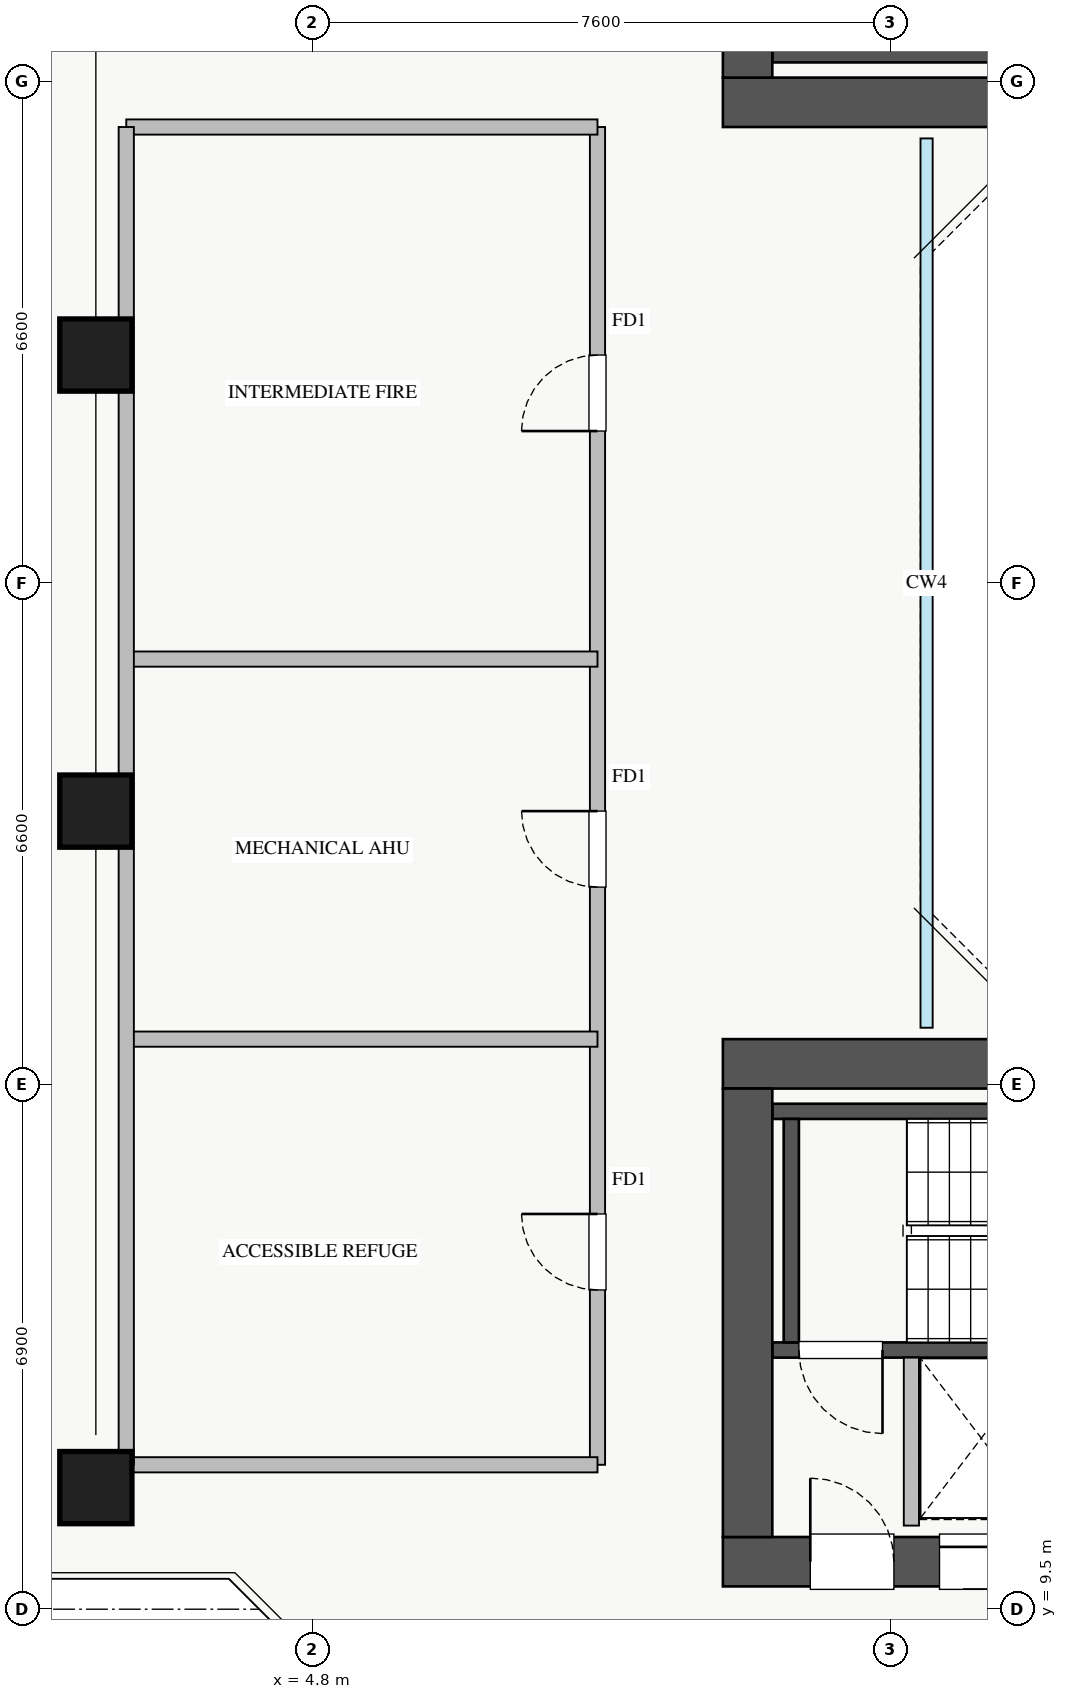
"""IFC4 building model, lengths in metres.
Left out: names, types, materials, properties, quantities, classifications, styles, units other than length and angle.
Written with IfcOpenShell. Run it as: python <this file> out.ifc"""

import sys

from ifc_helpers import new_model, si_unit, direction, frame, frame_2d, origin, origin_2d, place, context, subcontext, project, spatial, rectangle, extrude, source, transform, mapped, element, fill, save


model = new_model("IFC4")
c1 = context("Model", 3, precision=1e-05, world=origin(), true_north=direction((0.0, 1.0)))
c2 = subcontext(c1, "Body", "Model", "MODEL_VIEW")
j1 = project(units=[si_unit("LENGTHUNIT", "METRE"), si_unit("PLANEANGLEUNIT", "RADIAN")], contexts=[c1])
p1 = place(None, origin())
s1 = spatial("IfcSite", under=j1, at=p1, CompositionType="ELEMENT")
p2 = place(p1, origin())
s2 = spatial("IfcBuilding", under=s1, at=p2, CompositionType="ELEMENT")
p3 = place(p2, frame((0.0, 0.0, 186.0)))
s3 = spatial("IfcBuildingStorey", under=s2, at=p3, CompositionType="ELEMENT", Elevation=186.0)
p4 = place(p3, frame((12.68, 12.8, 0.0), z_axis=(0.0, 0.0, 1.0), x_axis=(1.0, 0.0, 0.0)))
e1 = element("IfcWall", 1, at=p4, inside=s3, PredefinedType="SHEAR", context=c2, shape_type="SweptSolid", body=[
    extrude(rectangle(XDim=1.94, YDim=0.18, at=frame_2d((0.97, 0.0))), origin(), (0.0, 0.0, 1.0), 4.32),
])
p5 = place(p3, frame((10.85, 29.95, 0.0), z_axis=(0.0, 0.0, 1.0), x_axis=(1.0, 0.0, 0.0)))
e2 = element("IfcWall", 2, at=p5, inside=s3, PredefinedType="SHEAR", context=c2, shape_type="SweptSolid", body=[
    extrude(rectangle(XDim=7.3, YDim=0.2, at=frame_2d((3.65, 0.0))), origin(), (0.0, 0.0, 1.0), 4.5),
])
p6 = place(p3, frame((10.85, 12.91, 0.0), z_axis=(0.0, 0.0, 1.0), x_axis=(1.0, 0.0, 0.0)))
e3 = element("IfcWall", 3, at=p6, inside=s3, PredefinedType="SHEAR", context=c2, shape_type="SweptSolid", body=[
    extrude(rectangle(XDim=7.3, YDim=0.2, at=frame_2d((3.65, 0.0))), origin(), (0.0, 0.0, 1.0), 4.5),
])
p7 = place(p6, frame((0.35, 0.0, 0.0)))
e4 = element("IfcOpeningElement", 4, at=p7, cuts=e3, PredefinedType="OPENING", context=c2, shape_type="SweptSolid", body=[
    extrude(rectangle(XDim=1.1, YDim=2.05, at=frame_2d((0.55, 1.025))), frame((0.0, 0.11, 0.0), z_axis=(0.0, -1.0, 0.0), x_axis=(1.0, 0.0, 0.0)), (0.0, 0.0, 1.0), 0.22),
])
p8 = place(p3, frame((10.85, 16.05, 0.0), z_axis=(0.0, 0.0, 1.0), x_axis=(1.0, 0.0, 0.0)))
e5 = element("IfcWall", 5, at=p8, inside=s3, PredefinedType="SHEAR", context=c2, shape_type="SweptSolid", body=[
    extrude(rectangle(XDim=7.3, YDim=0.2, at=frame_2d((3.65, 0.0))), origin(), (0.0, 0.0, 1.0), 4.5),
])
p9 = place(p3, frame((11.1, 13.01, 0.0), z_axis=(0.0, 0.0, 1.0), x_axis=(0.0, 1.0, 0.0)))
e6 = element("IfcWall", 6, at=p9, inside=s3, PredefinedType="SHEAR", context=c2, shape_type="SweptSolid", body=[
    extrude(rectangle(XDim=2.94, YDim=0.2, at=frame_2d((1.47, 0.0))), origin(), (0.0, 0.0, 1.0), 4.5),
])
p10 = place(p3, frame((10.2, 29.325, 0.0), z_axis=(0.0, 0.0, 1.0), x_axis=(1.0, 0.0, 0.0)))
e7 = element("IfcWall", 7, at=p10, inside=s3, PredefinedType="SHEAR", context=c2, shape_type="SweptSolid", body=[
    extrude(rectangle(XDim=17.6, YDim=0.65, at=frame_2d((8.8, 0.0))), origin(), (0.0, 0.0, 1.0), 4.5),
])
p11 = place(p3, frame((10.525, 29.65, 0.0), z_axis=(0.0, 0.0, 1.0), x_axis=(0.0, 1.0, 0.0)))
e8 = element("IfcWall", 8, at=p11, inside=s3, PredefinedType="SHEAR", context=c2, shape_type="SweptSolid", body=[
    extrude(rectangle(XDim=5.9, YDim=0.65, at=frame_2d((2.95, 0.0))), origin(), (0.0, 0.0, 1.0), 4.5),
])
p12 = place(p3, frame((10.2, 10.125, 0.0), z_axis=(0.0, 0.0, 1.0), x_axis=(1.0, 0.0, 0.0)))
e9 = element("IfcWall", 9, at=p12, inside=s3, PredefinedType="SHEAR", context=c2, shape_type="SweptSolid", body=[
    extrude(rectangle(XDim=17.6, YDim=0.65, at=frame_2d((8.8, 0.0))), origin(), (0.0, 0.0, 1.0), 4.5),
])
p13 = place(p12, frame((1.15, 0.0, 0.0)))
e10 = element("IfcOpeningElement", 10, at=p13, cuts=e9, PredefinedType="OPENING", context=c2, shape_type="SweptSolid", body=[
    extrude(rectangle(XDim=1.1, YDim=2.05, at=frame_2d((0.55, 1.025))), frame((0.0, 0.335, 0.0), z_axis=(0.0, -1.0, 0.0), x_axis=(1.0, 0.0, 0.0)), (0.0, 0.0, 1.0), 0.67),
])
p14 = place(p12, frame((8.3, 0.0, 0.0)))
e11 = element("IfcOpeningElement", 11, at=p14, cuts=e9, PredefinedType="OPENING", context=c2, shape_type="SweptSolid", body=[
    extrude(rectangle(XDim=1.1, YDim=2.05, at=frame_2d((0.55, 1.025))), frame((0.0, 0.335, 0.0), z_axis=(0.0, -1.0, 0.0), x_axis=(1.0, 0.0, 0.0)), (0.0, 0.0, 1.0), 0.67),
])
p15 = place(p12, frame((2.85, 0.0, 0.0)))
e12 = element("IfcOpeningElement", 12, at=p15, cuts=e9, PredefinedType="OPENING", context=c2, shape_type="SweptSolid", body=[
    extrude(rectangle(XDim=1.1, YDim=2.05, at=frame_2d((0.55, 1.025))), frame((0.0, 0.335, 0.0), z_axis=(0.0, -1.0, 0.0), x_axis=(1.0, 0.0, 0.0)), (0.0, 0.0, 1.0), 0.67),
])
p16 = place(p12, frame((14.74, 0.0, 0.0)))
e13 = element("IfcOpeningElement", 13, at=p16, cuts=e9, PredefinedType="OPENING", context=c2, shape_type="SweptSolid", body=[
    extrude(rectangle(XDim=1.0, YDim=2.05, at=frame_2d((0.5, 1.025))), frame((0.0, 0.335, 0.0), z_axis=(0.0, -1.0, 0.0), x_axis=(1.0, 0.0, 0.0)), (0.0, 0.0, 1.0), 0.67),
])
p17 = place(p12, frame((11.67, 0.0, 0.0)))
e14 = element("IfcOpeningElement", 14, at=p17, cuts=e9, PredefinedType="OPENING", context=c2, shape_type="SweptSolid", body=[
    extrude(rectangle(XDim=1.0, YDim=2.05, at=frame_2d((0.5, 1.025))), frame((0.0, 0.335, 0.0), z_axis=(0.0, -1.0, 0.0), x_axis=(1.0, 0.0, 0.0)), (0.0, 0.0, 1.0), 0.67),
])
p18 = place(p3, frame((10.2, 16.675, 0.0), z_axis=(0.0, 0.0, 1.0), x_axis=(1.0, 0.0, 0.0)))
e15 = element("IfcWall", 15, at=p18, inside=s3, PredefinedType="SHEAR", context=c2, shape_type="SweptSolid", body=[
    extrude(rectangle(XDim=17.6, YDim=0.65, at=frame_2d((8.8, 0.0))), origin(), (0.0, 0.0, 1.0), 4.5),
])
p19 = place(p3, frame((10.525, 10.45, 0.0), z_axis=(0.0, 0.0, 1.0), x_axis=(0.0, 1.0, 0.0)))
e16 = element("IfcWall", 16, at=p19, inside=s3, PredefinedType="SHEAR", context=c2, shape_type="SweptSolid", body=[
    extrude(rectangle(XDim=5.9, YDim=0.65, at=frame_2d((2.95, 0.0))), origin(), (0.0, 0.0, 1.0), 4.5),
])
m1 = source(origin(), c2, "Body", "SweptSolid", [
    extrude(rectangle(XDim=0.95, YDim=0.95, at=origin_2d()), origin(), (0.0, 0.0, 1.0), 4.5),
])
for number, where, z_axis, x_axis in (
    (17, (1.95, 26.0, 0.0), (0.0, 0.0, 1.0), (1.0, 0.0, 0.0)),
    (18, (1.95, 20.0, 0.0), (0.0, 0.0, 1.0), (1.0, 0.0, 0.0)),
    (19, (1.95, 11.1, 0.0), (0.0, 0.0, 1.0), (1.0, 0.0, 0.0)),
):
    element("IfcColumn", number, at=place(p3, frame(where, z_axis=z_axis, x_axis=x_axis)), inside=s3, PredefinedType="COLUMN", context=c2, shape_type="MappedRepresentation", body=[
        mapped(m1, transform((0.0, 0.0, 0.0), x_axis=(1.0, 0.0, 0.0), y_axis=(0.0, 1.0, 0.0), z_axis=(0.0, 0.0, 1.0), scale=1.0)),
    ])
p20 = place(p3, frame((12.68, 10.6, 0.0), z_axis=(0.0, 0.0, 1.0), x_axis=(0.0, 1.0, 0.0)))
e20 = element("IfcWall", 20, at=p20, inside=s3, PredefinedType="PARTITIONING", context=c2, shape_type="SweptSolid", body=[
    extrude(rectangle(XDim=2.21, YDim=0.2, at=frame_2d((1.105, 0.0))), origin(), (0.0, 0.0, 1.0), 4.32),
])
p21 = place(p3, frame((8.55, 11.4, 0.0), z_axis=(0.0, 0.0, 1.0), x_axis=(0.0, 1.0, 0.0)))
e21 = element("IfcWall", 21, at=p21, inside=s3, PredefinedType="PARTITIONING", context=c2, shape_type="SweptSolid", body=[
    extrude(rectangle(XDim=17.6, YDim=0.2, at=frame_2d((8.8, 0.0))), origin(), (0.0, 0.0, 1.0), 2.515),
])
p22 = place(p21, frame((7.6, 0.0, 0.0)))
e22 = element("IfcOpeningElement", 22, at=p22, cuts=e21, PredefinedType="OPENING", context=c2, shape_type="SweptSolid", body=[
    extrude(rectangle(XDim=1.0, YDim=2.05, at=frame_2d((0.5, 1.025))), frame((0.0, 0.11, 0.0), z_axis=(0.0, -1.0, 0.0), x_axis=(1.0, 0.0, 0.0)), (0.0, 0.0, 1.0), 0.22),
])
p23 = place(p21, frame((13.6, 0.0, 0.0)))
e23 = element("IfcOpeningElement", 23, at=p23, cuts=e21, PredefinedType="OPENING", context=c2, shape_type="SweptSolid", body=[
    extrude(rectangle(XDim=1.0, YDim=2.05, at=frame_2d((0.5, 1.025))), frame((0.0, 0.11, 0.0), z_axis=(0.0, -1.0, 0.0), x_axis=(1.0, 0.0, 0.0)), (0.0, 0.0, 1.0), 0.22),
])
p24 = place(p21, frame((2.3, 0.0, 0.0)))
e24 = element("IfcOpeningElement", 24, at=p24, cuts=e21, PredefinedType="OPENING", context=c2, shape_type="SweptSolid", body=[
    extrude(rectangle(XDim=1.0, YDim=2.05, at=frame_2d((0.5, 1.025))), frame((0.0, 0.11, 0.0), z_axis=(0.0, -1.0, 0.0), x_axis=(1.0, 0.0, 0.0)), (0.0, 0.0, 1.0), 0.22),
])
p25 = place(p3, frame((2.35, 11.4, 0.0), z_axis=(0.0, 0.0, 1.0), x_axis=(1.0, 0.0, 0.0)))
e25 = element("IfcWall", 25, at=p25, inside=s3, PredefinedType="PARTITIONING", context=c2, shape_type="SweptSolid", body=[
    extrude(rectangle(XDim=6.2, YDim=0.2, at=frame_2d((3.1, 0.0))), origin(), (0.0, 0.0, 1.0), 2.515),
])
for number, where, z_axis, x_axis in (
    (26, (2.35, 17.0, 0.0), (0.0, 0.0, 1.0), (1.0, 0.0, 0.0)),
    (27, (2.35, 22.0, 0.0), (0.0, 0.0, 1.0), (1.0, 0.0, 0.0)),
    (28, (2.35, 29.0, 0.0), (0.0, 0.0, 1.0), (1.0, 0.0, 0.0)),
):
    element("IfcWall", number, at=place(p3, frame(where, z_axis=z_axis, x_axis=x_axis)), inside=s3, PredefinedType="PARTITIONING", context=c2, shape_type="SweptSolid", body=[
        extrude(rectangle(XDim=6.2, YDim=0.2, at=frame_2d((3.1, 0.0))), origin(), (0.0, 0.0, 1.0), 4.32),
    ])
p26 = place(p3, frame((2.35, 11.4, 0.0), z_axis=(0.0, 0.0, 1.0), x_axis=(0.0, 1.0, 0.0)))
e29 = element("IfcWall", 29, at=p26, inside=s3, PredefinedType="PARTITIONING", context=c2, shape_type="SweptSolid", body=[
    extrude(rectangle(XDim=17.6, YDim=0.2, at=frame_2d((8.8, 0.0))), origin(), (0.0, 0.0, 1.0), 1.915),
])
m2 = source(origin(), c2, "Body", "SweptSolid", [
    extrude(rectangle(XDim=1.1, YDim=2.05, at=frame_2d((0.55, 1.025))), frame((0.0, 0.025, 0.0), z_axis=(0.0, -1.0, 0.0), x_axis=(1.0, 0.0, 0.0)), (0.0, 0.0, 1.0), 0.05),
])
p27 = place(p13, origin())
e30 = element("IfcDoor", 30, at=p27, inside=s3, OperationType="SINGLE_SWING_LEFT", PredefinedType="DOOR", context=c2, shape_type="MappedRepresentation", body=[
    mapped(m2, transform((0.0, 0.0, 0.0), x_axis=(1.0, 0.0, 0.0), y_axis=(0.0, 1.0, 0.0), z_axis=(0.0, 0.0, 1.0), scale=1.0)),
])
fill(e10, e30)
p28 = place(p7, frame((1.1, 0.0, 0.0), z_axis=(0.0, 0.0, 1.0), x_axis=(-1.0, 0.0, 0.0)))
e31 = element("IfcDoor", 31, at=p28, inside=s3, OperationType="SINGLE_SWING_RIGHT", PredefinedType="DOOR", context=c2, shape_type="MappedRepresentation", body=[
    mapped(m2, transform((0.0, 0.0, 0.0), x_axis=(1.0, 0.0, 0.0), y_axis=(0.0, 1.0, 0.0), z_axis=(0.0, 0.0, 1.0), scale=1.0)),
])
fill(e4, e31)
p29 = place(p15, origin())
e32 = element("IfcDoor", 32, at=p29, inside=s3, OperationType="SLIDING_TO_RIGHT", PredefinedType="DOOR", context=c2, shape_type="MappedRepresentation", body=[
    mapped(m2, transform((0.0, 0.0, 0.0), x_axis=(1.0, 0.0, 0.0), y_axis=(0.0, 1.0, 0.0), z_axis=(0.0, 0.0, 1.0), scale=1.0)),
])
fill(e12, e32)
m3 = source(origin(), c2, "Body", "SweptSolid", [
    extrude(rectangle(XDim=1.0, YDim=2.05, at=frame_2d((0.5, 1.025))), frame((0.0, 0.025, 0.0), z_axis=(0.0, -1.0, 0.0), x_axis=(1.0, 0.0, 0.0)), (0.0, 0.0, 1.0), 0.05),
])
p30 = place(p22, origin())
e33 = element("IfcDoor", 33, at=p30, inside=s3, OperationType="SINGLE_SWING_RIGHT", PredefinedType="DOOR", context=c2, shape_type="MappedRepresentation", body=[
    mapped(m3, transform((0.0, 0.0, 0.0), x_axis=(1.0, 0.0, 0.0), y_axis=(0.0, 1.0, 0.0), z_axis=(0.0, 0.0, 1.0), scale=1.0)),
])
fill(e22, e33)
p31 = place(p23, origin())
e34 = element("IfcDoor", 34, at=p31, inside=s3, OperationType="SINGLE_SWING_LEFT", PredefinedType="DOOR", context=c2, shape_type="MappedRepresentation", body=[
    mapped(m3, transform((0.0, 0.0, 0.0), x_axis=(1.0, 0.0, 0.0), y_axis=(0.0, 1.0, 0.0), z_axis=(0.0, 0.0, 1.0), scale=1.0)),
])
fill(e23, e34)
p32 = place(p24, origin())
e35 = element("IfcDoor", 35, at=p32, inside=s3, OperationType="SINGLE_SWING_RIGHT", PredefinedType="DOOR", context=c2, shape_type="MappedRepresentation", body=[
    mapped(m3, transform((0.0, 0.0, 0.0), x_axis=(1.0, 0.0, 0.0), y_axis=(0.0, 1.0, 0.0), z_axis=(0.0, 0.0, 1.0), scale=1.0)),
])
fill(e24, e35)
save(model, sys.argv[1])
